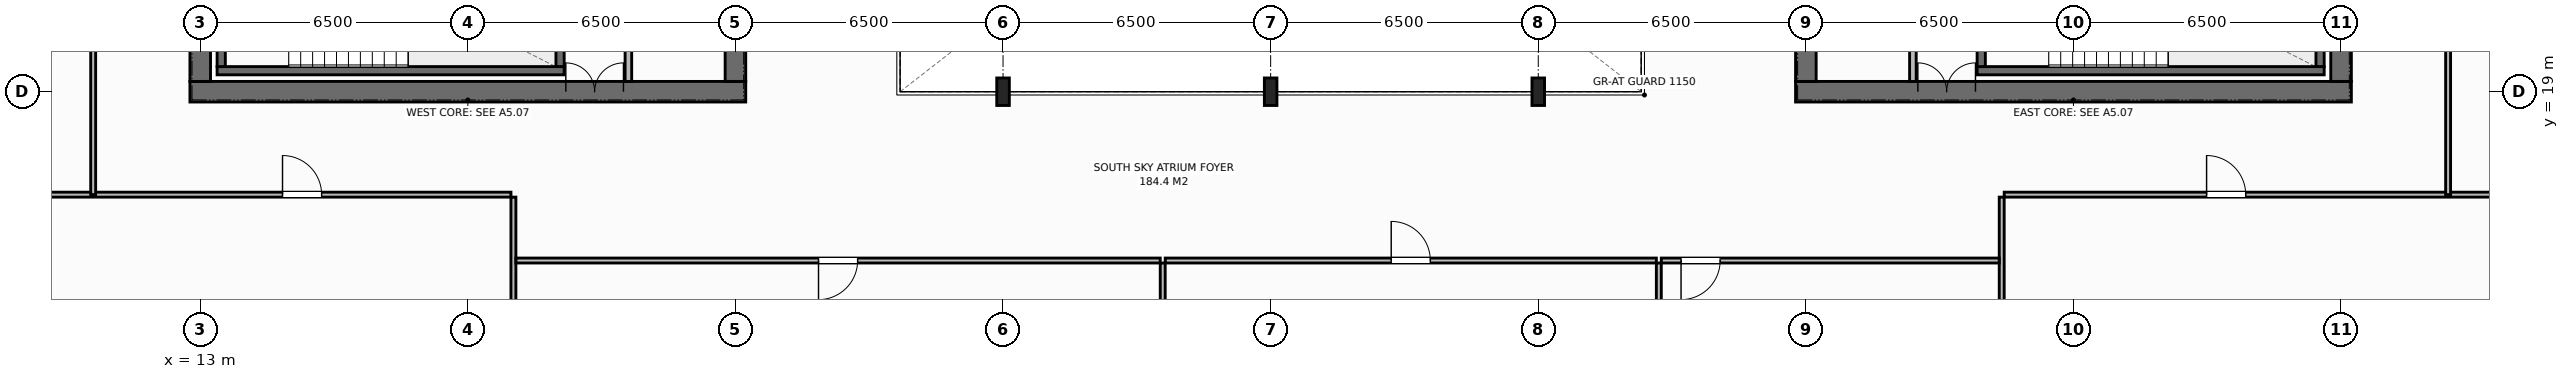
"""IFC4 building model, lengths in metres.
Left out: names, types, materials, properties, quantities, classifications, styles, units other than length and angle.
Written with IfcOpenShell. Run it as: python <this file> out.ifc"""

import sys

from ifc_helpers import new_model, si_unit, direction, frame, frame_2d, origin, origin_2d, place, context, subcontext, project, spatial, rectangle, i_section, extrude, element, fill, save


model = new_model("IFC4")
c1 = context("Model", 3, precision=1e-05, world=origin(), true_north=direction((0.0, 1.0)))
c2 = subcontext(c1, "Body", "Model", "MODEL_VIEW")
j1 = project(units=[si_unit("LENGTHUNIT", "METRE"), si_unit("PLANEANGLEUNIT", "RADIAN")], contexts=[c1])
p1 = place(None, origin())
s1 = spatial("IfcSite", under=j1, at=p1, CompositionType="ELEMENT")
p2 = place(p1, origin())
s2 = spatial("IfcBuilding", under=s1, at=p2, CompositionType="ELEMENT")
p3 = place(p2, frame((0.0, 0.0, 259.4)))
s3 = spatial("IfcBuildingStorey", under=s2, at=p3, CompositionType="ELEMENT", Elevation=259.4)
p4 = place(p3, frame((12.75, 19.0, 0.0), z_axis=(0.0, 0.0, 1.0), x_axis=(1.0, 0.0, 0.0)))
e1 = element("IfcWall", 1, at=p4, inside=s3, PredefinedType="SHEAR", context=c2, shape_type="SweptSolid", body=[
    extrude(rectangle(XDim=13.5, YDim=0.5, at=frame_2d((6.75, 0.0))), origin(), (0.0, 0.0, 1.0), 3.8),
])
p5 = place(p4, frame((9.13, 0.0, 0.0)))
e2 = element("IfcOpeningElement", 2, at=p5, cuts=e1, PredefinedType="OPENING", context=c2, shape_type="SweptSolid", body=[
    extrude(rectangle(XDim=1.4, YDim=2.2, at=frame_2d((0.7, 1.1))), frame((0.0, 0.26, 0.0), z_axis=(0.0, -1.0, 0.0), x_axis=(1.0, 0.0, 0.0)), (0.0, 0.0, 1.0), 0.52),
])
p6 = place(p3, frame((13.0, 19.25, 0.0), z_axis=(0.0, 0.0, 1.0), x_axis=(0.0, 1.0, 0.0)))
e3 = element("IfcWall", 3, at=p6, inside=s3, PredefinedType="SHEAR", context=c2, shape_type="SweptSolid", body=[
    extrude(rectangle(XDim=13.5, YDim=0.5, at=frame_2d((6.75, 0.0))), origin(), (0.0, 0.0, 1.0), 3.8),
])
p7 = place(p6, frame((4.8, 0.0, 0.0)))
e4 = element("IfcOpeningElement", 4, at=p7, cuts=e3, PredefinedType="OPENING", context=c2, shape_type="SweptSolid", body=[
    extrude(rectangle(XDim=1.4, YDim=2.2, at=frame_2d((0.7, 1.1))), frame((0.0, 0.26, 0.0), z_axis=(0.0, -1.0, 0.0), x_axis=(1.0, 0.0, 0.0)), (0.0, 0.0, 1.0), 0.52),
])
p8 = place(p3, frame((26.0, 19.25, 0.0), z_axis=(0.0, 0.0, 1.0), x_axis=(0.0, 1.0, 0.0)))
e5 = element("IfcWall", 5, at=p8, inside=s3, PredefinedType="SHEAR", context=c2, shape_type="SweptSolid", body=[
    extrude(rectangle(XDim=13.5, YDim=0.5, at=frame_2d((6.75, 0.0))), origin(), (0.0, 0.0, 1.0), 3.8),
])
p9 = place(p3, frame((51.75, 19.0, 0.0), z_axis=(0.0, 0.0, 1.0), x_axis=(1.0, 0.0, 0.0)))
e6 = element("IfcWall", 6, at=p9, inside=s3, PredefinedType="SHEAR", context=c2, shape_type="SweptSolid", body=[
    extrude(rectangle(XDim=13.5, YDim=0.5, at=frame_2d((6.75, 0.0))), origin(), (0.0, 0.0, 1.0), 3.8),
])
p10 = place(p9, frame((2.97, 0.0, 0.0)))
e7 = element("IfcOpeningElement", 7, at=p10, cuts=e6, PredefinedType="OPENING", context=c2, shape_type="SweptSolid", body=[
    extrude(rectangle(XDim=1.4, YDim=2.2, at=frame_2d((0.7, 1.1))), frame((0.0, 0.26, 0.0), z_axis=(0.0, -1.0, 0.0), x_axis=(1.0, 0.0, 0.0)), (0.0, 0.0, 1.0), 0.52),
])
p11 = place(p3, frame((52.0, 19.25, 0.0), z_axis=(0.0, 0.0, 1.0), x_axis=(0.0, 1.0, 0.0)))
e8 = element("IfcWall", 8, at=p11, inside=s3, PredefinedType="SHEAR", context=c2, shape_type="SweptSolid", body=[
    extrude(rectangle(XDim=13.5, YDim=0.5, at=frame_2d((6.75, 0.0))), origin(), (0.0, 0.0, 1.0), 3.8),
])
p12 = place(p3, frame((65.0, 19.25, 0.0), z_axis=(0.0, 0.0, 1.0), x_axis=(0.0, 1.0, 0.0)))
e9 = element("IfcWall", 9, at=p12, inside=s3, PredefinedType="SHEAR", context=c2, shape_type="SweptSolid", body=[
    extrude(rectangle(XDim=13.5, YDim=0.5, at=frame_2d((6.75, 0.0))), origin(), (0.0, 0.0, 1.0), 3.8),
])
p13 = place(p12, frame((8.2, 0.0, 0.0)))
e10 = element("IfcOpeningElement", 10, at=p13, cuts=e9, PredefinedType="OPENING", context=c2, shape_type="SweptSolid", body=[
    extrude(rectangle(XDim=1.3, YDim=2.2, at=frame_2d((0.65, 1.1))), frame((0.0, 0.26, 0.0), z_axis=(0.0, -1.0, 0.0), x_axis=(1.0, 0.0, 0.0)), (0.0, 0.0, 1.0), 0.52),
])
p14 = place(p3, frame((13.41, 19.51, 0.0), z_axis=(0.0, 0.0, 1.0), x_axis=(1.0, 0.0, 0.0)))
e11 = element("IfcWall", 11, at=p14, inside=s3, PredefinedType="SHEAR", context=c2, shape_type="SweptSolid", body=[
    extrude(rectangle(XDim=8.43, YDim=0.2, at=frame_2d((4.215, 0.0))), origin(), (0.0, 0.0, 1.0), 3.8),
])
for number, where, z_axis, x_axis in (
    (12, (13.51, 19.61, 0.0), (0.0, 0.0, 1.0), (0.0, 1.0, 0.0)),
    (13, (21.74, 19.61, 0.0), (0.0, 0.0, 1.0), (0.0, 1.0, 0.0)),
):
    element("IfcWall", number, at=place(p3, frame(where, z_axis=z_axis, x_axis=x_axis)), inside=s3, PredefinedType="SHEAR", context=c2, shape_type="SweptSolid", body=[
        extrude(rectangle(XDim=3.28, YDim=0.2, at=frame_2d((1.64, 0.0))), origin(), (0.0, 0.0, 1.0), 3.8),
    ])
p15 = place(p3, frame((56.16, 19.51, 0.0), z_axis=(0.0, 0.0, 1.0), x_axis=(1.0, 0.0, 0.0)))
e14 = element("IfcWall", 14, at=p15, inside=s3, PredefinedType="SHEAR", context=c2, shape_type="SweptSolid", body=[
    extrude(rectangle(XDim=8.43, YDim=0.2, at=frame_2d((4.215, 0.0))), origin(), (0.0, 0.0, 1.0), 3.8),
])
for number, where, z_axis, x_axis in (
    (15, (56.26, 19.61, 0.0), (0.0, 0.0, 1.0), (0.0, 1.0, 0.0)),
    (16, (64.49, 19.61, 0.0), (0.0, 0.0, 1.0), (0.0, 1.0, 0.0)),
):
    element("IfcWall", number, at=place(p3, frame(where, z_axis=z_axis, x_axis=x_axis)), inside=s3, PredefinedType="SHEAR", context=c2, shape_type="SweptSolid", body=[
        extrude(rectangle(XDim=3.28, YDim=0.2, at=frame_2d((1.64, 0.0))), origin(), (0.0, 0.0, 1.0), 3.8),
    ])
for number, where, z_axis, x_axis in (
    (17, (32.5, 19.0, 0.0), (0.0, 0.0, 1.0), (1.0, 0.0, 0.0)),
    (18, (39.0, 19.0, 0.0), (0.0, 0.0, 1.0), (1.0, 0.0, 0.0)),
    (19, (45.5, 19.0, 0.0), (0.0, 0.0, 1.0), (1.0, 0.0, 0.0)),
):
    element("IfcColumn", number, at=place(p3, frame(where, z_axis=z_axis, x_axis=x_axis)), inside=s3, PredefinedType="COLUMN", context=c2, shape_type="SweptSolid", body=[
        extrude(i_section(OverallWidth=0.305, OverallDepth=0.668, WebThickness=0.021, FlangeThickness=0.04, at=origin_2d()), origin(), (0.0, 0.0, 1.0), 3.8),
    ])
p16 = place(p3, frame((23.4, 19.25, 0.0), z_axis=(0.0, 0.0, 1.0), x_axis=(0.0, 1.0, 0.0)))
e20 = element("IfcWall", 20, at=p16, inside=s3, PredefinedType="STANDARD", context=c2, shape_type="SweptSolid", body=[
    extrude(rectangle(XDim=13.5, YDim=0.16, at=frame_2d((6.75, 0.0))), origin(), (0.0, 0.0, 1.0), 3.588),
])
p17 = place(p16, frame((2.25, 0.0, 0.0)))
e21 = element("IfcOpeningElement", 21, at=p17, cuts=e20, PredefinedType="OPENING", context=c2, shape_type="SweptSolid", body=[
    extrude(rectangle(XDim=0.95, YDim=2.15, at=frame_2d((0.475, 1.075))), frame((0.0, 0.09, 0.0), z_axis=(0.0, -1.0, 0.0), x_axis=(1.0, 0.0, 0.0)), (0.0, 0.0, 1.0), 0.18),
])
p18 = place(p16, frame((6.35, 0.0, 0.0)))
e22 = element("IfcOpeningElement", 22, at=p18, cuts=e20, PredefinedType="OPENING", context=c2, shape_type="SweptSolid", body=[
    extrude(rectangle(XDim=0.95, YDim=2.15, at=frame_2d((0.475, 1.075))), frame((0.0, 0.09, 0.0), z_axis=(0.0, -1.0, 0.0), x_axis=(1.0, 0.0, 0.0)), (0.0, 0.0, 1.0), 0.18),
])
p19 = place(p16, frame((9.35, 0.0, 0.0)))
e23 = element("IfcOpeningElement", 23, at=p19, cuts=e20, PredefinedType="OPENING", context=c2, shape_type="SweptSolid", body=[
    extrude(rectangle(XDim=1.1, YDim=2.2, at=frame_2d((0.55, 1.1))), frame((0.0, 0.09, 0.0), z_axis=(0.0, -1.0, 0.0), x_axis=(1.0, 0.0, 0.0)), (0.0, 0.0, 1.0), 0.18),
])
p20 = place(p16, frame((11.55, 0.0, 0.0)))
e24 = element("IfcOpeningElement", 24, at=p20, cuts=e20, PredefinedType="OPENING", context=c2, shape_type="SweptSolid", body=[
    extrude(rectangle(XDim=1.1, YDim=2.2, at=frame_2d((0.55, 1.1))), frame((0.0, 0.09, 0.0), z_axis=(0.0, -1.0, 0.0), x_axis=(1.0, 0.0, 0.0)), (0.0, 0.0, 1.0), 0.18),
])
p21 = place(p3, frame((54.6, 19.25, 0.0), z_axis=(0.0, 0.0, 1.0), x_axis=(0.0, 1.0, 0.0)))
e25 = element("IfcWall", 25, at=p21, inside=s3, PredefinedType="STANDARD", context=c2, shape_type="SweptSolid", body=[
    extrude(rectangle(XDim=13.5, YDim=0.16, at=frame_2d((6.75, 0.0))), origin(), (0.0, 0.0, 1.0), 3.588),
])
p22 = place(p21, frame((2.15, 0.0, 0.0)))
e26 = element("IfcOpeningElement", 26, at=p22, cuts=e25, PredefinedType="OPENING", context=c2, shape_type="SweptSolid", body=[
    extrude(rectangle(XDim=0.95, YDim=2.15, at=frame_2d((0.475, 1.075))), frame((0.0, 0.09, 0.0), z_axis=(0.0, -1.0, 0.0), x_axis=(1.0, 0.0, 0.0)), (0.0, 0.0, 1.0), 0.18),
])
p23 = place(p21, frame((6.25, 0.0, 0.0)))
e27 = element("IfcOpeningElement", 27, at=p23, cuts=e25, PredefinedType="OPENING", context=c2, shape_type="SweptSolid", body=[
    extrude(rectangle(XDim=0.95, YDim=2.15, at=frame_2d((0.475, 1.075))), frame((0.0, 0.09, 0.0), z_axis=(0.0, -1.0, 0.0), x_axis=(1.0, 0.0, 0.0)), (0.0, 0.0, 1.0), 0.18),
])
p24 = place(p21, frame((9.35, 0.0, 0.0)))
e28 = element("IfcOpeningElement", 28, at=p24, cuts=e25, PredefinedType="OPENING", context=c2, shape_type="SweptSolid", body=[
    extrude(rectangle(XDim=1.1, YDim=2.2, at=frame_2d((0.55, 1.1))), frame((0.0, 0.09, 0.0), z_axis=(0.0, -1.0, 0.0), x_axis=(1.0, 0.0, 0.0)), (0.0, 0.0, 1.0), 0.18),
])
p25 = place(p21, frame((11.55, 0.0, 0.0)))
e29 = element("IfcOpeningElement", 29, at=p25, cuts=e25, PredefinedType="OPENING", context=c2, shape_type="SweptSolid", body=[
    extrude(rectangle(XDim=1.1, YDim=2.2, at=frame_2d((0.55, 1.1))), frame((0.0, 0.09, 0.0), z_axis=(0.0, -1.0, 0.0), x_axis=(1.0, 0.0, 0.0)), (0.0, 0.0, 1.0), 0.18),
])
p26 = place(p3, frame((20.607, 5.12, 0.0), z_axis=(0.0, 0.0, 1.0), x_axis=(0.0, 1.0, 0.0)))
e30 = element("IfcWall", 30, at=p26, inside=s3, PredefinedType="PARTITIONING", context=c2, shape_type="SweptSolid", body=[
    extrude(rectangle(XDim=11.32, YDim=0.12, at=frame_2d((5.66, 0.0))), origin(), (0.0, 0.0, 1.0), 3.588),
])
p27 = place(p3, frame((7.38, 16.5, 0.0), z_axis=(0.0, 0.0, 1.0), x_axis=(1.0, 0.0, 0.0)))
e31 = element("IfcWall", 31, at=p27, inside=s3, PredefinedType="PARTITIONING", context=c2, shape_type="SweptSolid", body=[
    extrude(rectangle(XDim=13.167, YDim=0.12, at=frame_2d((6.583, 0.0))), origin(), (0.0, 0.0, 1.0), 3.588),
])
p28 = place(p27, frame((7.619, 0.0, 0.0)))
e32 = element("IfcOpeningElement", 32, at=p28, cuts=e31, PredefinedType="OPENING", context=c2, shape_type="SweptSolid", body=[
    extrude(rectangle(XDim=0.95, YDim=2.15, at=frame_2d((0.475, 1.075))), frame((0.0, 0.07, 0.0), z_axis=(0.0, -1.0, 0.0), x_axis=(1.0, 0.0, 0.0)), (0.0, 0.0, 1.0), 0.14),
])
p29 = place(p3, frame((36.378, 5.12, 0.0), z_axis=(0.0, 0.0, 1.0), x_axis=(0.0, 1.0, 0.0)))
e33 = element("IfcWall", 33, at=p29, inside=s3, PredefinedType="PARTITIONING", context=c2, shape_type="SweptSolid", body=[
    extrude(rectangle(XDim=9.72, YDim=0.12, at=frame_2d((4.86, 0.0))), origin(), (0.0, 0.0, 1.0), 3.588),
])
p30 = place(p3, frame((20.667, 14.9, 0.0), z_axis=(0.0, 0.0, 1.0), x_axis=(1.0, 0.0, 0.0)))
e34 = element("IfcWall", 34, at=p30, inside=s3, PredefinedType="PARTITIONING", context=c2, shape_type="SweptSolid", body=[
    extrude(rectangle(XDim=15.651, YDim=0.12, at=frame_2d((7.826, 0.0))), origin(), (0.0, 0.0, 1.0), 3.588),
])
p31 = place(p30, frame((7.351, 0.0, 0.0)))
e35 = element("IfcOpeningElement", 35, at=p31, cuts=e34, PredefinedType="OPENING", context=c2, shape_type="SweptSolid", body=[
    extrude(rectangle(XDim=0.95, YDim=2.15, at=frame_2d((0.475, 1.075))), frame((0.0, 0.07, 0.0), z_axis=(0.0, -1.0, 0.0), x_axis=(1.0, 0.0, 0.0)), (0.0, 0.0, 1.0), 0.14),
])
p32 = place(p3, frame((48.428, 5.12, 0.0), z_axis=(0.0, 0.0, 1.0), x_axis=(0.0, 1.0, 0.0)))
e36 = element("IfcWall", 36, at=p32, inside=s3, PredefinedType="PARTITIONING", context=c2, shape_type="SweptSolid", body=[
    extrude(rectangle(XDim=9.72, YDim=0.12, at=frame_2d((4.86, 0.0))), origin(), (0.0, 0.0, 1.0), 3.588),
])
p33 = place(p3, frame((36.438, 14.9, 0.0), z_axis=(0.0, 0.0, 1.0), x_axis=(1.0, 0.0, 0.0)))
e37 = element("IfcWall", 37, at=p33, inside=s3, PredefinedType="PARTITIONING", context=c2, shape_type="SweptSolid", body=[
    extrude(rectangle(XDim=11.93, YDim=0.12, at=frame_2d((5.965, 0.0))), origin(), (0.0, 0.0, 1.0), 3.588),
])
p34 = place(p33, frame((5.49, 0.0, 0.0)))
e38 = element("IfcOpeningElement", 38, at=p34, cuts=e37, PredefinedType="OPENING", context=c2, shape_type="SweptSolid", body=[
    extrude(rectangle(XDim=0.95, YDim=2.15, at=frame_2d((0.475, 1.075))), frame((0.0, 0.07, 0.0), z_axis=(0.0, -1.0, 0.0), x_axis=(1.0, 0.0, 0.0)), (0.0, 0.0, 1.0), 0.14),
])
p35 = place(p3, frame((56.757, 5.12, 0.0), z_axis=(0.0, 0.0, 1.0), x_axis=(0.0, 1.0, 0.0)))
e39 = element("IfcWall", 39, at=p35, inside=s3, PredefinedType="PARTITIONING", context=c2, shape_type="SweptSolid", body=[
    extrude(rectangle(XDim=11.32, YDim=0.12, at=frame_2d((5.66, 0.0))), origin(), (0.0, 0.0, 1.0), 3.588),
])
p36 = place(p3, frame((48.489, 14.9, 0.0), z_axis=(0.0, 0.0, 1.0), x_axis=(1.0, 0.0, 0.0)))
e40 = element("IfcWall", 40, at=p36, inside=s3, PredefinedType="PARTITIONING", context=c2, shape_type="SweptSolid", body=[
    extrude(rectangle(XDim=8.209, YDim=0.12, at=frame_2d((4.104, 0.0))), origin(), (0.0, 0.0, 1.0), 3.588),
])
p37 = place(p36, frame((0.48, 0.0, 0.0)))
e41 = element("IfcOpeningElement", 41, at=p37, cuts=e40, PredefinedType="OPENING", context=c2, shape_type="SweptSolid", body=[
    extrude(rectangle(XDim=0.95, YDim=2.15, at=frame_2d((0.475, 1.075))), frame((0.0, 0.07, 0.0), z_axis=(0.0, -1.0, 0.0), x_axis=(1.0, 0.0, 0.0)), (0.0, 0.0, 1.0), 0.14),
])
p38 = place(p3, frame((56.817, 16.5, 0.0), z_axis=(0.0, 0.0, 1.0), x_axis=(1.0, 0.0, 0.0)))
e42 = element("IfcWall", 42, at=p38, inside=s3, PredefinedType="PARTITIONING", context=c2, shape_type="SweptSolid", body=[
    extrude(rectangle(XDim=13.851, YDim=0.12, at=frame_2d((6.925, 0.0))), origin(), (0.0, 0.0, 1.0), 3.588),
])
p39 = place(p38, frame((4.917, 0.0, 0.0)))
e43 = element("IfcOpeningElement", 43, at=p39, cuts=e42, PredefinedType="OPENING", context=c2, shape_type="SweptSolid", body=[
    extrude(rectangle(XDim=0.95, YDim=2.15, at=frame_2d((0.475, 1.075))), frame((0.0, 0.07, 0.0), z_axis=(0.0, -1.0, 0.0), x_axis=(1.0, 0.0, 0.0)), (0.0, 0.0, 1.0), 0.14),
])
p40 = place(p3, frame((10.4, 16.5, 0.0), z_axis=(0.0, 0.0, 1.0), x_axis=(0.0, 1.0, 0.0)))
e44 = element("IfcWall", 44, at=p40, inside=s3, PredefinedType="PARTITIONING", context=c2, shape_type="SweptSolid", body=[
    extrude(rectangle(XDim=6.333, YDim=0.12, at=frame_2d((3.167, 0.0))), origin(), (0.0, 0.0, 1.0), 3.588),
])
p41 = place(p40, frame((3.742, 0.0, 0.0)))
e45 = element("IfcOpeningElement", 45, at=p41, cuts=e44, PredefinedType="OPENING", context=c2, shape_type="SweptSolid", body=[
    extrude(rectangle(XDim=0.95, YDim=2.15, at=frame_2d((0.475, 1.075))), frame((0.0, 0.07, 0.0), z_axis=(0.0, -1.0, 0.0), x_axis=(1.0, 0.0, 0.0)), (0.0, 0.0, 1.0), 0.14),
])
p42 = place(p3, frame((67.6, 16.5, 0.0), z_axis=(0.0, 0.0, 1.0), x_axis=(0.0, 1.0, 0.0)))
e46 = element("IfcWall", 46, at=p42, inside=s3, PredefinedType="PARTITIONING", context=c2, shape_type="SweptSolid", body=[
    extrude(rectangle(XDim=19.0, YDim=0.12, at=frame_2d((9.5, 0.0))), origin(), (0.0, 0.0, 1.0), 3.588),
])
p43 = place(p42, frame((9.025, 0.0, 0.0)))
e47 = element("IfcOpeningElement", 47, at=p43, cuts=e46, PredefinedType="OPENING", context=c2, shape_type="SweptSolid", body=[
    extrude(rectangle(XDim=0.95, YDim=2.15, at=frame_2d((0.475, 1.075))), frame((0.0, 0.07, 0.0), z_axis=(0.0, -1.0, 0.0), x_axis=(1.0, 0.0, 0.0)), (0.0, 0.0, 1.0), 0.14),
])
p44 = place(p5, origin())
e48 = element("IfcDoor", 48, at=p44, inside=s3, OperationType="DOUBLE_DOOR_SINGLE_SWING", PredefinedType="DOOR", context=c2, shape_type="SweptSolid", body=[
    extrude(rectangle(XDim=1.4, YDim=2.2, at=frame_2d((0.7, 1.1))), frame((0.0, 0.075, 0.0), z_axis=(0.0, -1.0, 0.0), x_axis=(1.0, 0.0, 0.0)), (0.0, 0.0, 1.0), 0.05),
])
fill(e2, e48)
p45 = place(p10, origin())
e49 = element("IfcDoor", 49, at=p45, inside=s3, OperationType="DOUBLE_DOOR_SINGLE_SWING", PredefinedType="DOOR", context=c2, shape_type="SweptSolid", body=[
    extrude(rectangle(XDim=1.4, YDim=2.2, at=frame_2d((0.7, 1.1))), frame((0.0, 0.075, 0.0), z_axis=(0.0, -1.0, 0.0), x_axis=(1.0, 0.0, 0.0)), (0.0, 0.0, 1.0), 0.05),
])
fill(e7, e49)
p46 = place(p28, origin())
e50 = element("IfcDoor", 50, at=p46, inside=s3, OperationType="SINGLE_SWING_LEFT", PredefinedType="DOOR", context=c2, shape_type="SweptSolid", body=[
    extrude(rectangle(XDim=0.95, YDim=2.15, at=frame_2d((0.475, 1.075))), frame((0.0, 0.025, 0.0), z_axis=(0.0, -1.0, 0.0), x_axis=(1.0, 0.0, 0.0)), (0.0, 0.0, 1.0), 0.05),
])
fill(e32, e50)
p47 = place(p31, origin())
e51 = element("IfcDoor", 51, at=p47, inside=s3, OperationType="SINGLE_SWING_RIGHT", PredefinedType="DOOR", context=c2, shape_type="SweptSolid", body=[
    extrude(rectangle(XDim=0.95, YDim=2.15, at=frame_2d((0.475, 1.075))), frame((0.0, 0.025, 0.0), z_axis=(0.0, -1.0, 0.0), x_axis=(1.0, 0.0, 0.0)), (0.0, 0.0, 1.0), 0.05),
])
fill(e35, e51)
p48 = place(p34, origin())
e52 = element("IfcDoor", 52, at=p48, inside=s3, OperationType="SINGLE_SWING_LEFT", PredefinedType="DOOR", context=c2, shape_type="SweptSolid", body=[
    extrude(rectangle(XDim=0.95, YDim=2.15, at=frame_2d((0.475, 1.075))), frame((0.0, 0.025, 0.0), z_axis=(0.0, -1.0, 0.0), x_axis=(1.0, 0.0, 0.0)), (0.0, 0.0, 1.0), 0.05),
])
fill(e38, e52)
p49 = place(p37, origin())
e53 = element("IfcDoor", 53, at=p49, inside=s3, OperationType="SINGLE_SWING_RIGHT", PredefinedType="DOOR", context=c2, shape_type="SweptSolid", body=[
    extrude(rectangle(XDim=0.95, YDim=2.15, at=frame_2d((0.475, 1.075))), frame((0.0, 0.025, 0.0), z_axis=(0.0, -1.0, 0.0), x_axis=(1.0, 0.0, 0.0)), (0.0, 0.0, 1.0), 0.05),
])
fill(e41, e53)
p50 = place(p39, origin())
e54 = element("IfcDoor", 54, at=p50, inside=s3, OperationType="SINGLE_SWING_LEFT", PredefinedType="DOOR", context=c2, shape_type="SweptSolid", body=[
    extrude(rectangle(XDim=0.95, YDim=2.15, at=frame_2d((0.475, 1.075))), frame((0.0, 0.025, 0.0), z_axis=(0.0, -1.0, 0.0), x_axis=(1.0, 0.0, 0.0)), (0.0, 0.0, 1.0), 0.05),
])
fill(e43, e54)
save(model, sys.argv[1])
